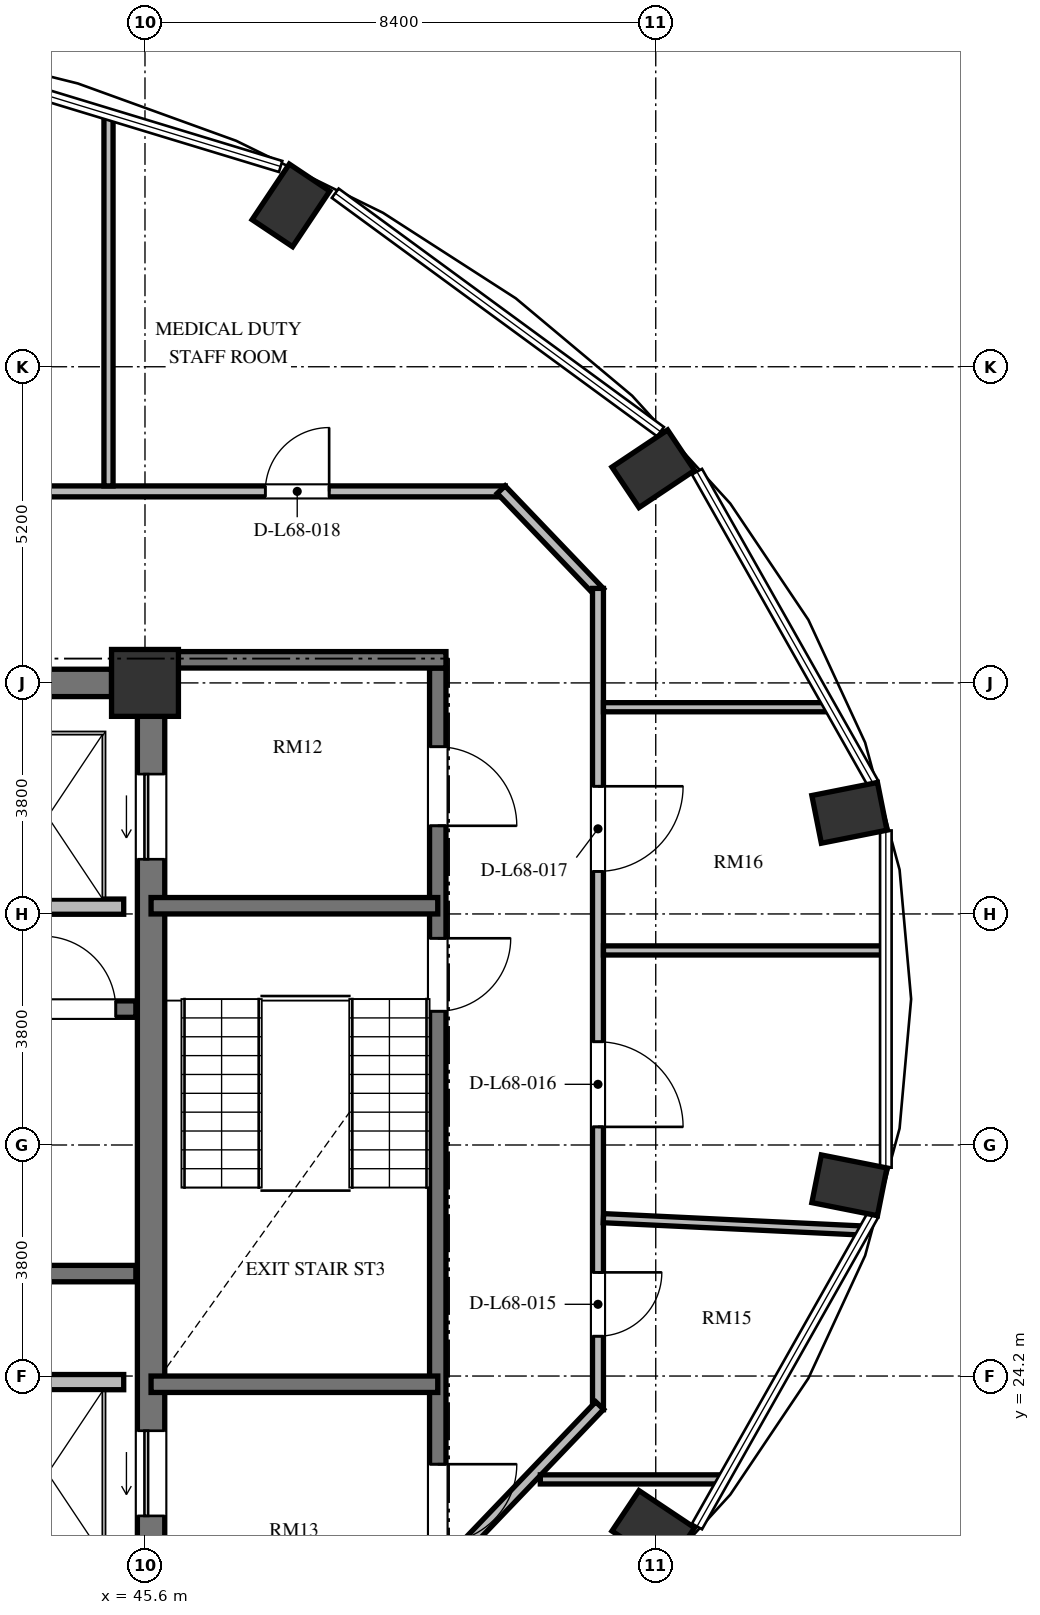
"""IFC4 building model, lengths in metres.
Left out: names, types, materials, properties, quantities, classifications, styles, units other than length and angle.
Written with IfcOpenShell. Run it as: python <this file> out.ifc"""

import sys

from ifc_helpers import new_model, si_unit, direction, frame, frame_2d, origin, origin_2d, place, context, subcontext, project, spatial, rectangle, extrude, element, fill, save


model = new_model("IFC4")
c1 = context("Model", 3, precision=1e-05, world=origin(), true_north=direction((0.0, 1.0)))
c2 = subcontext(c1, "Body", "Model", "MODEL_VIEW")
j1 = project(units=[si_unit("LENGTHUNIT", "METRE"), si_unit("PLANEANGLEUNIT", "RADIAN")], contexts=[c1])
p1 = place(None, origin())
s1 = spatial("IfcSite", under=j1, at=p1, CompositionType="ELEMENT")
p2 = place(p1, origin())
s2 = spatial("IfcBuilding", under=s1, at=p2, CompositionType="ELEMENT")
p3 = place(p2, frame((0.0, 0.0, 262.32)))
s3 = spatial("IfcBuildingStorey", under=s2, at=p3, CompositionType="ELEMENT", Elevation=262.32)
for number, where, z_axis, x_axis in (
    (1, (53.96, 21.677, 0.0), (0.0, 0.0, 1.0), (0.831, -0.556, 0.0)),
    (2, (57.185, 27.337, 0.0), (0.0, 0.0, 1.0), (0.981, -0.195, 0.0)),
    (3, (57.185, 33.463, 0.0), (0.0, 0.0, 1.0), (0.981, 0.195, 0.0)),
    (4, (53.96, 39.123, 0.0), (0.0, 0.0, 1.0), (0.831, 0.556, 0.0)),
    (5, (48.0, 43.454, 0.0), (0.0, 0.0, 1.0), (0.556, 0.831, 0.0)),
):
    element("IfcColumn", number, at=place(p3, frame(where, z_axis=z_axis, x_axis=x_axis)), inside=s3, PredefinedType="COLUMN", context=c2, shape_type="SweptSolid", body=[
        extrude(rectangle(XDim=1.1, YDim=0.8, at=origin_2d()), origin(), (0.0, 0.0, 1.0), 3.648),
    ])
p4 = place(p3, frame((45.6, 35.6, 0.0), z_axis=(0.0, 0.0, 1.0), x_axis=(1.0, 0.0, 0.0)))
e6 = element("IfcColumn", 6, at=p4, inside=s3, PredefinedType="COLUMN", context=c2, shape_type="SweptSolid", body=[
    extrude(rectangle(XDim=1.1, YDim=1.1, at=origin_2d()), origin(), (0.0, 0.0, 1.0), 3.648),
])
p5 = place(p3, frame((45.7, 20.95, 0.0), z_axis=(0.0, 0.0, 1.0), x_axis=(0.0, 1.0, 0.0)))
e7 = element("IfcWall", 7, at=p5, inside=s3, PredefinedType="SHEAR", context=c2, shape_type="SweptSolid", body=[
    extrude(rectangle(XDim=14.1, YDim=0.45, at=frame_2d((7.05, 0.0))), origin(), (0.0, 0.0, 1.0), 3.648),
])
p6 = place(p5, frame((11.75, 0.0, 0.0)))
e8 = element("IfcOpeningElement", 8, at=p6, cuts=e7, PredefinedType="OPENING", context=c2, shape_type="SweptSolid", body=[
    extrude(rectangle(XDim=1.4, YDim=2.3, at=frame_2d((0.7, 1.15))), frame((0.0, 0.235, 0.0), z_axis=(0.0, -1.0, 0.0), x_axis=(1.0, 0.0, 0.0)), (0.0, 0.0, 1.0), 0.47),
])
p7 = place(p5, frame((0.95, 0.0, 0.0)))
e9 = element("IfcOpeningElement", 9, at=p7, cuts=e7, PredefinedType="OPENING", context=c2, shape_type="SweptSolid", body=[
    extrude(rectangle(XDim=1.4, YDim=2.3, at=frame_2d((0.7, 1.15))), frame((0.0, 0.235, 0.0), z_axis=(0.0, -1.0, 0.0), x_axis=(1.0, 0.0, 0.0)), (0.0, 0.0, 1.0), 0.47),
])
p8 = place(p3, frame((39.6, 35.6, 0.0), z_axis=(0.0, 0.0, 1.0), x_axis=(1.0, 0.0, 0.0)))
e10 = element("IfcWall", 10, at=p8, inside=s3, PredefinedType="SHEAR", context=c2, shape_type="SweptSolid", body=[
    extrude(rectangle(XDim=5.45, YDim=0.45, at=frame_2d((2.725, 0.0))), origin(), (0.0, 0.0, 1.0), 3.648),
])
p9 = place(p3, frame((37.465, 30.235, 0.0), z_axis=(0.0, 0.0, 1.0), x_axis=(1.0, 0.0, 0.0)))
e11 = element("IfcWall", 11, at=p9, inside=s3, PredefinedType="SHEAR", context=c2, shape_type="SweptSolid", body=[
    extrude(rectangle(XDim=7.985, YDim=0.27, at=frame_2d((3.992, 0.0))), origin(), (0.0, 0.0, 1.0), 3.648),
])
p10 = place(p9, frame((6.455, 0.0, 0.0)))
e12 = element("IfcOpeningElement", 12, at=p10, cuts=e11, PredefinedType="OPENING", context=c2, shape_type="SweptSolid", body=[
    extrude(rectangle(XDim=1.2, YDim=2.15, at=frame_2d((0.6, 1.075))), frame((0.0, 0.145, 0.0), z_axis=(0.0, -1.0, 0.0), x_axis=(1.0, 0.0, 0.0)), (0.0, 0.0, 1.0), 0.29),
])
p11 = place(p3, frame((37.465, 25.885, 0.0), z_axis=(0.0, 0.0, 1.0), x_axis=(1.0, 0.0, 0.0)))
e13 = element("IfcWall", 13, at=p11, inside=s3, PredefinedType="SHEAR", context=c2, shape_type="SweptSolid", body=[
    extrude(rectangle(XDim=7.985, YDim=0.27, at=frame_2d((3.992, 0.0))), origin(), (0.0, 0.0, 1.0), 3.648),
])
for number, where, z_axis, x_axis in (
    (14, (42.95, 31.92, 0.0), (0.0, 0.0, 1.0), (1.0, 0.0, 0.0)),
    (15, (42.95, 24.1, 0.0), (0.0, 0.0, 1.0), (1.0, 0.0, 0.0)),
):
    element("IfcWall", number, at=place(p3, frame(where, z_axis=z_axis, x_axis=x_axis)), inside=s3, PredefinedType="SOLIDWALL", context=c2, shape_type="SweptSolid", body=[
        extrude(rectangle(XDim=2.3, YDim=0.25, at=frame_2d((1.15, 0.0))), origin(), (0.0, 0.0, 1.0), 3.448),
    ])
p12 = place(p3, frame((50.415, 35.845, 0.0), z_axis=(0.0, 0.0, 1.0), x_axis=(0.0, -1.0, 0.0)))
e16 = element("IfcWall", 16, at=p12, inside=s3, PredefinedType="SHEAR", context=c2, shape_type="SweptSolid", body=[
    extrude(rectangle(XDim=15.825, YDim=0.27, at=frame_2d((7.913, 0.0))), origin(), (0.0, 0.0, 1.0), 3.648),
])
p13 = place(p12, frame((4.445, 0.0, 0.0)))
e17 = element("IfcOpeningElement", 17, at=p13, cuts=e16, PredefinedType="OPENING", context=c2, shape_type="SweptSolid", body=[
    extrude(rectangle(XDim=1.2, YDim=2.15, at=frame_2d((0.6, 1.075))), frame((0.0, 0.145, 0.0), z_axis=(0.0, -1.0, 0.0), x_axis=(1.0, 0.0, 0.0)), (0.0, 0.0, 1.0), 0.29),
])
p14 = place(p12, frame((1.295, 0.0, 0.0)))
e18 = element("IfcOpeningElement", 18, at=p14, cuts=e16, PredefinedType="OPENING", context=c2, shape_type="SweptSolid", body=[
    extrude(rectangle(XDim=1.3, YDim=2.2, at=frame_2d((0.65, 1.1))), frame((0.0, 0.145, 0.0), z_axis=(0.0, -1.0, 0.0), x_axis=(1.0, 0.0, 0.0)), (0.0, 0.0, 1.0), 0.29),
])
p15 = place(p12, frame((13.095, 0.0, 0.0)))
e19 = element("IfcOpeningElement", 19, at=p15, cuts=e16, PredefinedType="OPENING", context=c2, shape_type="SweptSolid", body=[
    extrude(rectangle(XDim=1.3, YDim=2.2, at=frame_2d((0.65, 1.1))), frame((0.0, 0.145, 0.0), z_axis=(0.0, -1.0, 0.0), x_axis=(1.0, 0.0, 0.0)), (0.0, 0.0, 1.0), 0.29),
])
p16 = place(p3, frame((45.925, 35.98, 0.0), z_axis=(0.0, 0.0, 1.0), x_axis=(1.0, 0.0, 0.0)))
e20 = element("IfcWall", 20, at=p16, inside=s3, PredefinedType="SHEAR", context=c2, shape_type="SweptSolid", body=[
    extrude(rectangle(XDim=4.625, YDim=0.27, at=frame_2d((2.312, 0.0))), origin(), (0.0, 0.0, 1.0), 3.648),
])
for number, where, z_axis, x_axis in (
    (21, (45.7, 31.935, 0.0), (0.0, 0.0, 1.0), (1.0, 0.0, 0.0)),
    (22, (45.7, 24.065, 0.0), (0.0, 0.0, 1.0), (1.0, 0.0, 0.0)),
):
    element("IfcWall", number, at=place(p3, frame(where, z_axis=z_axis, x_axis=x_axis)), inside=s3, PredefinedType="SHEAR", context=c2, shape_type="SweptSolid", body=[
        extrude(rectangle(XDim=4.715, YDim=0.27, at=frame_2d((2.357, 0.0))), origin(), (0.0, 0.0, 1.0), 3.648),
    ])
p17 = place(p3, frame((30.71, 38.75, 0.0), z_axis=(0.0, 0.0, 1.0), x_axis=(1.0, 0.0, 0.0)))
e23 = element("IfcWall", 23, at=p17, inside=s3, PredefinedType="PARTITIONING", context=c2, shape_type="SweptSolid", body=[
    extrude(rectangle(XDim=20.815, YDim=0.18, at=frame_2d((10.408, 0.0))), origin(), (0.0, 0.0, 1.0), 3.073),
])
p18 = place(p17, frame((16.869, 0.0, 0.0)))
e24 = element("IfcOpeningElement", 24, at=p18, cuts=e23, PredefinedType="OPENING", context=c2, shape_type="SweptSolid", body=[
    extrude(rectangle(XDim=1.05, YDim=2.15, at=frame_2d((0.525, 1.075))), frame((0.0, 0.1, 0.0), z_axis=(0.0, -1.0, 0.0), x_axis=(1.0, 0.0, 0.0)), (0.0, 0.0, 1.0), 0.2),
])
p19 = place(p17, frame((8.765, 0.0, 0.0)))
e25 = element("IfcOpeningElement", 25, at=p19, cuts=e23, PredefinedType="OPENING", context=c2, shape_type="SweptSolid", body=[
    extrude(rectangle(XDim=1.05, YDim=2.15, at=frame_2d((0.525, 1.075))), frame((0.0, 0.1, 0.0), z_axis=(0.0, -1.0, 0.0), x_axis=(1.0, 0.0, 0.0)), (0.0, 0.0, 1.0), 0.2),
])
p20 = place(p3, frame((51.458, 38.779, 0.0), z_axis=(0.0, 0.0, 1.0), x_axis=(0.691359830363, -0.722510612352, 0.0)))
e26 = element("IfcWall", 26, at=p20, inside=s3, PredefinedType="PARTITIONING", context=c2, shape_type="SweptSolid", body=[
    extrude(rectangle(XDim=2.343, YDim=0.18, at=frame_2d((1.172, 0.0))), origin(), (0.0, 0.0, 1.0), 3.033),
])
p21 = place(p3, frame((53.05, 37.155, 0.0), z_axis=(0.0, 0.0, 1.0), x_axis=(0.0, -1.0, 0.0)))
e27 = element("IfcWall", 27, at=p21, inside=s3, PredefinedType="PARTITIONING", context=c2, shape_type="SweptSolid", body=[
    extrude(rectangle(XDim=13.509, YDim=0.18, at=frame_2d((6.754, 0.0))), origin(), (0.0, 0.0, 1.0), 3.448),
])
p22 = place(p21, frame((11.25, 0.0, 0.0)))
e28 = element("IfcOpeningElement", 28, at=p22, cuts=e27, PredefinedType="OPENING", context=c2, shape_type="SweptSolid", body=[
    extrude(rectangle(XDim=1.05, YDim=2.15, at=frame_2d((0.525, 1.075))), frame((0.0, 0.1, 0.0), z_axis=(0.0, -1.0, 0.0), x_axis=(1.0, 0.0, 0.0)), (0.0, 0.0, 1.0), 0.2),
])
p23 = place(p21, frame((7.457, 0.0, 0.0)))
e29 = element("IfcOpeningElement", 29, at=p23, cuts=e27, PredefinedType="OPENING", context=c2, shape_type="SweptSolid", body=[
    extrude(rectangle(XDim=1.4, YDim=2.2, at=frame_2d((0.7, 1.1))), frame((0.0, 0.1, 0.0), z_axis=(0.0, -1.0, 0.0), x_axis=(1.0, 0.0, 0.0)), (0.0, 0.0, 1.0), 0.2),
])
p24 = place(p21, frame((3.254, 0.0, 0.0)))
e30 = element("IfcOpeningElement", 30, at=p24, cuts=e27, PredefinedType="OPENING", context=c2, shape_type="SweptSolid", body=[
    extrude(rectangle(XDim=1.4, YDim=2.2, at=frame_2d((0.7, 1.1))), frame((0.0, 0.1, 0.0), z_axis=(0.0, -1.0, 0.0), x_axis=(1.0, 0.0, 0.0)), (0.0, 0.0, 1.0), 0.2),
])
p25 = place(p3, frame((53.078, 23.714, 0.0), z_axis=(0.0, 0.0, 1.0), x_axis=(-0.691353379446, -0.722516785085, 0.0)))
e31 = element("IfcWall", 31, at=p25, inside=s3, PredefinedType="PARTITIONING", context=c2, shape_type="SweptSolid", body=[
    extrude(rectangle(XDim=3.604, YDim=0.18, at=frame_2d((1.802, 0.0))), origin(), (0.0, 0.0, 1.0), 3.448),
])
p26 = place(p3, frame((52.102, 22.5, 0.0), z_axis=(0.0, 0.0, 1.0), x_axis=(1.0, 0.0, 0.0)))
e32 = element("IfcWall", 32, at=p26, inside=s3, PredefinedType="PARTITIONING", context=c2, shape_type="SweptSolid", body=[
    extrude(rectangle(XDim=3.003, YDim=0.15, at=frame_2d((1.501, 0.0))), origin(), (0.0, 0.0, 1.0), 3.448),
])
p27 = place(p3, frame((53.14, 26.796, 0.0), z_axis=(0.0, 0.0, 1.0), x_axis=(0.998865822675, -0.04761374058, 0.0)))
e33 = element("IfcWall", 33, at=p27, inside=s3, PredefinedType="PARTITIONING", context=c2, shape_type="SweptSolid", body=[
    extrude(rectangle(XDim=4.297, YDim=0.15, at=frame_2d((2.148, 0.0))), origin(), (0.0, 0.0, 1.0), 3.448),
])
p28 = place(p3, frame((53.14, 31.2, 0.0), z_axis=(0.0, 0.0, 1.0), x_axis=(1.0, 0.0, 0.0)))
e34 = element("IfcWall", 34, at=p28, inside=s3, PredefinedType="PARTITIONING", context=c2, shape_type="SweptSolid", body=[
    extrude(rectangle(XDim=4.632, YDim=0.15, at=frame_2d((2.316, 0.0))), origin(), (0.0, 0.0, 1.0), 3.448),
])
p29 = place(p3, frame((53.14, 35.2, 0.0), z_axis=(0.0, 0.0, 1.0), x_axis=(1.0, 0.0, 0.0)))
e35 = element("IfcWall", 35, at=p29, inside=s3, PredefinedType="PARTITIONING", context=c2, shape_type="SweptSolid", body=[
    extrude(rectangle(XDim=3.717, YDim=0.15, at=frame_2d((1.858, 0.0))), origin(), (0.0, 0.0, 1.0), 3.448),
])
p30 = place(p3, frame((45.0, 38.84, 0.0), z_axis=(0.0, 0.0, 1.0), x_axis=(0.0, 1.0, 0.0)))
e36 = element("IfcWall", 36, at=p30, inside=s3, PredefinedType="PARTITIONING", context=c2, shape_type="SweptSolid", body=[
    extrude(rectangle(XDim=6.097, YDim=0.15, at=frame_2d((3.048, 0.0))), origin(), (0.0, 0.0, 1.0), 3.448),
])
p31 = place(p10, origin())
e37 = element("IfcDoor", 37, at=p31, inside=s3, OperationType="SINGLE_SWING_LEFT", PredefinedType="DOOR", context=c2, shape_type="SweptSolid", body=[
    extrude(rectangle(XDim=1.2, YDim=2.15, at=frame_2d((0.6, 1.075))), frame((0.0, 0.025, 0.0), z_axis=(0.0, -1.0, 0.0), x_axis=(1.0, 0.0, 0.0)), (0.0, 0.0, 1.0), 0.05),
])
fill(e12, e37)
p32 = place(p6, origin())
e38 = element("IfcDoor", 38, at=p32, inside=s3, OperationType="SLIDING_TO_LEFT", PredefinedType="DOOR", context=c2, shape_type="SweptSolid", body=[
    extrude(rectangle(XDim=1.4, YDim=2.3, at=frame_2d((0.7, 1.15))), frame((0.0, 0.025, 0.0), z_axis=(0.0, -1.0, 0.0), x_axis=(1.0, 0.0, 0.0)), (0.0, 0.0, 1.0), 0.05),
])
fill(e8, e38)
p33 = place(p7, origin())
e39 = element("IfcDoor", 39, at=p33, inside=s3, OperationType="SLIDING_TO_LEFT", PredefinedType="DOOR", context=c2, shape_type="SweptSolid", body=[
    extrude(rectangle(XDim=1.4, YDim=2.3, at=frame_2d((0.7, 1.15))), frame((0.0, 0.025, 0.0), z_axis=(0.0, -1.0, 0.0), x_axis=(1.0, 0.0, 0.0)), (0.0, 0.0, 1.0), 0.05),
])
fill(e9, e39)
p34 = place(p13, origin())
e40 = element("IfcDoor", 40, at=p34, inside=s3, OperationType="SINGLE_SWING_LEFT", PredefinedType="DOOR", context=c2, shape_type="SweptSolid", body=[
    extrude(rectangle(XDim=1.2, YDim=2.15, at=frame_2d((0.6, 1.075))), frame((0.0, 0.025, 0.0), z_axis=(0.0, -1.0, 0.0), x_axis=(1.0, 0.0, 0.0)), (0.0, 0.0, 1.0), 0.05),
])
fill(e17, e40)
p35 = place(p14, origin())
e41 = element("IfcDoor", 41, at=p35, inside=s3, OperationType="SINGLE_SWING_RIGHT", PredefinedType="DOOR", context=c2, shape_type="SweptSolid", body=[
    extrude(rectangle(XDim=1.3, YDim=2.2, at=frame_2d((0.65, 1.1))), frame((0.0, 0.025, 0.0), z_axis=(0.0, -1.0, 0.0), x_axis=(1.0, 0.0, 0.0)), (0.0, 0.0, 1.0), 0.05),
])
fill(e18, e41)
p36 = place(p15, origin())
e42 = element("IfcDoor", 42, at=p36, inside=s3, OperationType="SINGLE_SWING_LEFT", PredefinedType="DOOR", context=c2, shape_type="SweptSolid", body=[
    extrude(rectangle(XDim=1.3, YDim=2.2, at=frame_2d((0.65, 1.1))), frame((0.0, 0.025, 0.0), z_axis=(0.0, -1.0, 0.0), x_axis=(1.0, 0.0, 0.0)), (0.0, 0.0, 1.0), 0.05),
])
fill(e19, e42)
p37 = place(p22, origin())
e43 = element("IfcDoor", 43, at=p37, inside=s3, OperationType="SINGLE_SWING_LEFT", PredefinedType="DOOR", context=c2, shape_type="SweptSolid", body=[
    extrude(rectangle(XDim=1.05, YDim=2.15, at=frame_2d((0.525, 1.075))), frame((0.0, 0.025, 0.0), z_axis=(0.0, -1.0, 0.0), x_axis=(1.0, 0.0, 0.0)), (0.0, 0.0, 1.0), 0.05),
])
fill(e28, e43)
p38 = place(p23, origin())
e44 = element("IfcDoor", 44, at=p38, inside=s3, OperationType="SINGLE_SWING_RIGHT", PredefinedType="DOOR", context=c2, shape_type="SweptSolid", body=[
    extrude(rectangle(XDim=1.4, YDim=2.2, at=frame_2d((0.7, 1.1))), frame((0.0, 0.025, 0.0), z_axis=(0.0, -1.0, 0.0), x_axis=(1.0, 0.0, 0.0)), (0.0, 0.0, 1.0), 0.05),
])
fill(e29, e44)
p39 = place(p24, origin())
e45 = element("IfcDoor", 45, at=p39, inside=s3, OperationType="SINGLE_SWING_LEFT", PredefinedType="DOOR", context=c2, shape_type="SweptSolid", body=[
    extrude(rectangle(XDim=1.4, YDim=2.2, at=frame_2d((0.7, 1.1))), frame((0.0, 0.025, 0.0), z_axis=(0.0, -1.0, 0.0), x_axis=(1.0, 0.0, 0.0)), (0.0, 0.0, 1.0), 0.05),
])
fill(e30, e45)
p40 = place(p18, origin())
e46 = element("IfcDoor", 46, at=p40, inside=s3, OperationType="SINGLE_SWING_RIGHT", PredefinedType="DOOR", context=c2, shape_type="SweptSolid", body=[
    extrude(rectangle(XDim=1.05, YDim=2.15, at=frame_2d((0.525, 1.075))), frame((0.0, 0.025, 0.0), z_axis=(0.0, -1.0, 0.0), x_axis=(1.0, 0.0, 0.0)), (0.0, 0.0, 1.0), 0.05),
])
fill(e24, e46)
save(model, sys.argv[1])
